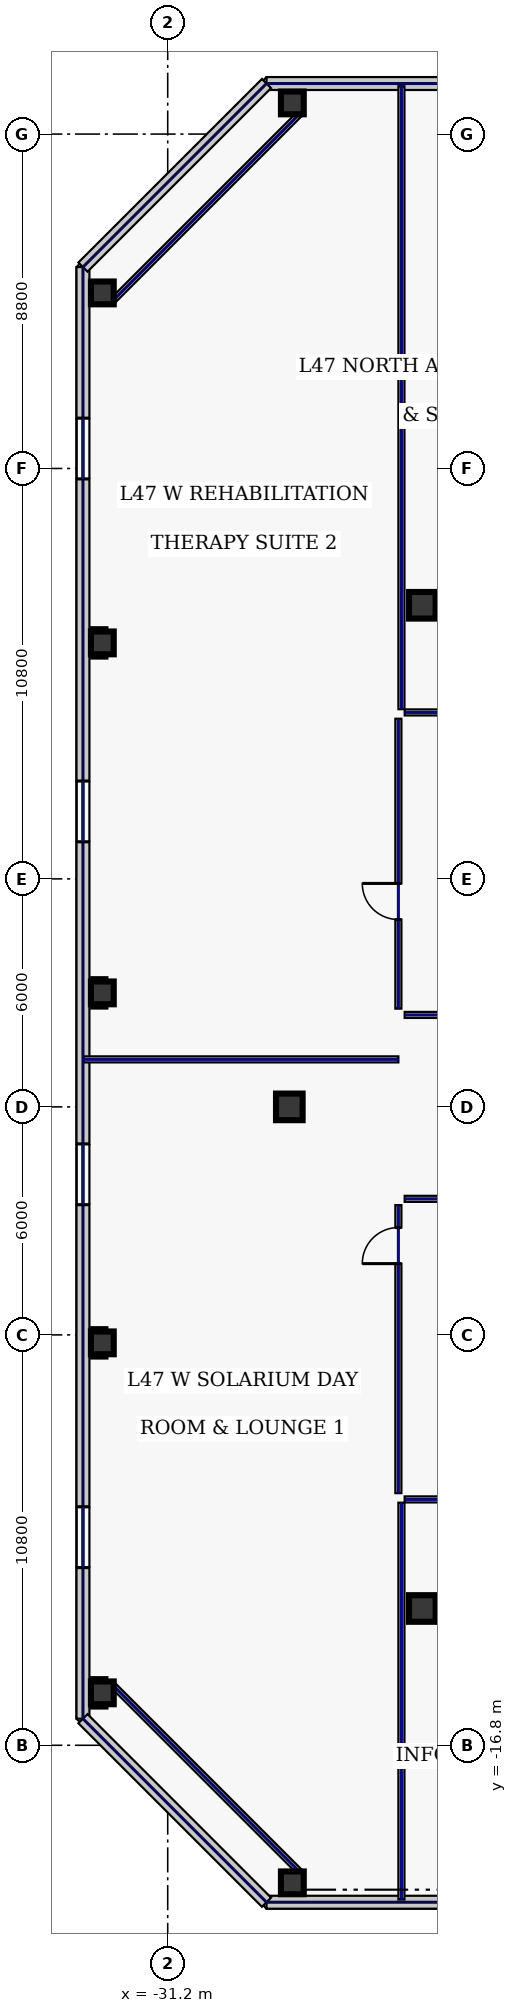
"""IFC4 building model, lengths in metres.
Left out: names, types, materials, properties, quantities, classifications, styles, units other than length and angle.
Written with IfcOpenShell. Run it as: python <this file> out.ifc"""

import sys

from ifc_helpers import new_model, si_unit, direction, frame, frame_2d, origin, origin_2d, place, context, subcontext, project, spatial, rectangle, hollow_rectangle, extrude, element, fill, save


model = new_model("IFC4")
c1 = context("Model", 3, precision=1e-05, world=origin(), true_north=direction((0.0, 1.0)))
c2 = subcontext(c1, "Body", "Model", "MODEL_VIEW")
j1 = project(units=[si_unit("LENGTHUNIT", "METRE"), si_unit("PLANEANGLEUNIT", "RADIAN")], contexts=[c1])
p1 = place(None, origin())
s1 = spatial("IfcSite", under=j1, at=p1, CompositionType="ELEMENT")
p2 = place(p1, origin())
s2 = spatial("IfcBuilding", under=s1, at=p2, CompositionType="ELEMENT")
p3 = place(p2, frame((0.0, 0.0, 204.2)))
s3 = spatial("IfcBuildingStorey", under=s2, at=p3, CompositionType="ELEMENT", Elevation=204.2)
for number, where, z_axis, x_axis in (
    (1, (-24.5, -13.2, 0.0), (0.0, 0.0, 1.0), (1.0, 0.0, 0.0)),
    (2, (-24.5, 13.2, 0.0), (0.0, 0.0, 1.0), (1.0, 0.0, 0.0)),
    (3, (-28.0, 0.0, 0.0), (0.0, 0.0, 1.0), (1.0, 0.0, 0.0)),
):
    element("IfcColumn", number, at=place(p3, frame(where, z_axis=z_axis, x_axis=x_axis)), inside=s3, PredefinedType="COLUMN", context=c2, shape_type="SweptSolid", body=[
        extrude(hollow_rectangle(XDim=0.7, YDim=0.7, WallThickness=0.032, at=origin_2d()), origin(), (0.0, 0.0, 1.0), 3.68),
    ])
for number, where, z_axis, x_axis in (
    (4, (-27.92, -20.42, 0.0), (0.0, 0.0, 1.0), (1.0, 0.0, 0.0)),
    (5, (-27.92, 26.42, 0.0), (0.0, 0.0, 1.0), (1.0, 0.0, 0.0)),
    (6, (-32.92, 21.42, 0.0), (0.0, 0.0, 1.0), (1.0, 0.0, 0.0)),
    (7, (-32.92, 12.21, 0.0), (0.0, 0.0, 1.0), (1.0, 0.0, 0.0)),
    (8, (-32.92, 3.0, 0.0), (0.0, 0.0, 1.0), (1.0, 0.0, 0.0)),
    (9, (-32.92, -6.21, 0.0), (0.0, 0.0, 1.0), (1.0, 0.0, 0.0)),
    (10, (-32.92, -15.42, 0.0), (0.0, 0.0, 1.0), (1.0, 0.0, 0.0)),
):
    element("IfcColumn", number, at=place(p3, frame(where, z_axis=z_axis, x_axis=x_axis)), inside=s3, PredefinedType="COLUMN", context=c2, shape_type="SweptSolid", body=[
        extrude(hollow_rectangle(XDim=0.6, YDim=0.6, WallThickness=0.028, at=origin_2d()), origin(), (0.0, 0.0, 1.0), 3.68),
    ])
p4 = place(p3, frame((-28.6, -20.93, 0.0), z_axis=(0.0, 0.0, 1.0), x_axis=(1.0, 0.0, 0.0)))
e11 = element("IfcWall", 11, at=p4, inside=s3, PredefinedType="STANDARD", context=c2, shape_type="SweptSolid", body=[
    extrude(rectangle(XDim=19.937, YDim=0.34, at=frame_2d((9.969, 0.0))), origin(), (0.0, 0.0, 1.0), 2.075),
])
p5 = place(p4, frame((6.204, 0.0, 0.22)))
e12 = element("IfcOpeningElement", 12, at=p5, cuts=e11, PredefinedType="OPENING", context=c2, shape_type="SweptSolid", body=[
    extrude(rectangle(XDim=1.6, YDim=1.2, at=frame_2d((0.8, 0.6))), frame((0.0, 0.18, 0.0), z_axis=(0.0, -1.0, 0.0), x_axis=(1.0, 0.0, 0.0)), (0.0, 0.0, 1.0), 0.36),
])
p6 = place(p4, frame((10.882, 0.0, 0.22)))
e13 = element("IfcOpeningElement", 13, at=p6, cuts=e11, PredefinedType="OPENING", context=c2, shape_type="SweptSolid", body=[
    extrude(rectangle(XDim=1.6, YDim=1.2, at=frame_2d((0.8, 0.6))), frame((0.0, 0.18, 0.0), z_axis=(0.0, -1.0, 0.0), x_axis=(1.0, 0.0, 0.0)), (0.0, 0.0, 1.0), 0.36),
])
p7 = place(p4, frame((14.867, 0.0, 0.22)))
e14 = element("IfcOpeningElement", 14, at=p7, cuts=e11, PredefinedType="OPENING", context=c2, shape_type="SweptSolid", body=[
    extrude(rectangle(XDim=1.6, YDim=1.2, at=frame_2d((0.8, 0.6))), frame((0.0, 0.18, 0.0), z_axis=(0.0, -1.0, 0.0), x_axis=(1.0, 0.0, 0.0)), (0.0, 0.0, 1.0), 0.36),
])
p8 = place(p3, frame((-8.663, 26.93, 0.0), z_axis=(0.0, 0.0, 1.0), x_axis=(-1.0, 0.0, 0.0)))
e15 = element("IfcWall", 15, at=p8, inside=s3, PredefinedType="STANDARD", context=c2, shape_type="SweptSolid", body=[
    extrude(rectangle(XDim=19.937, YDim=0.34, at=frame_2d((9.969, 0.0))), origin(), (0.0, 0.0, 1.0), 3.68),
])
p9 = place(p8, frame((7.455, 0.0, 0.22)))
e16 = element("IfcOpeningElement", 16, at=p9, cuts=e15, PredefinedType="OPENING", context=c2, shape_type="SweptSolid", body=[
    extrude(rectangle(XDim=1.6, YDim=1.2, at=frame_2d((0.8, 0.6))), frame((0.0, 0.18, 0.0), z_axis=(0.0, -1.0, 0.0), x_axis=(1.0, 0.0, 0.0)), (0.0, 0.0, 1.0), 0.36),
])
p10 = place(p3, frame((-33.43, 22.1, 0.0), z_axis=(0.0, 0.0, 1.0), x_axis=(0.0, -1.0, 0.0)))
e17 = element("IfcWall", 17, at=p10, inside=s3, PredefinedType="STANDARD", context=c2, shape_type="SweptSolid", body=[
    extrude(rectangle(XDim=38.2, YDim=0.34, at=frame_2d((19.1, 0.0))), origin(), (0.0, 0.0, 1.0), 2.075),
])
p11 = place(p10, frame((3.975, 0.0, 0.22)))
e18 = element("IfcOpeningElement", 18, at=p11, cuts=e17, PredefinedType="OPENING", context=c2, shape_type="SweptSolid", body=[
    extrude(rectangle(XDim=1.6, YDim=1.2, at=frame_2d((0.8, 0.6))), frame((0.0, 0.18, 0.0), z_axis=(0.0, -1.0, 0.0), x_axis=(1.0, 0.0, 0.0)), (0.0, 0.0, 1.0), 0.36),
])
p12 = place(p10, frame((13.525, 0.0, 0.22)))
e19 = element("IfcOpeningElement", 19, at=p12, cuts=e17, PredefinedType="OPENING", context=c2, shape_type="SweptSolid", body=[
    extrude(rectangle(XDim=1.6, YDim=1.2, at=frame_2d((0.8, 0.6))), frame((0.0, 0.18, 0.0), z_axis=(0.0, -1.0, 0.0), x_axis=(1.0, 0.0, 0.0)), (0.0, 0.0, 1.0), 0.36),
])
p13 = place(p10, frame((23.075, 0.0, 0.22)))
e20 = element("IfcOpeningElement", 20, at=p13, cuts=e17, PredefinedType="OPENING", context=c2, shape_type="SweptSolid", body=[
    extrude(rectangle(XDim=1.6, YDim=1.2, at=frame_2d((0.8, 0.6))), frame((0.0, 0.18, 0.0), z_axis=(0.0, -1.0, 0.0), x_axis=(1.0, 0.0, 0.0)), (0.0, 0.0, 1.0), 0.36),
])
p14 = place(p10, frame((32.625, 0.0, 0.22)))
e21 = element("IfcOpeningElement", 21, at=p14, cuts=e17, PredefinedType="OPENING", context=c2, shape_type="SweptSolid", body=[
    extrude(rectangle(XDim=1.6, YDim=1.2, at=frame_2d((0.8, 0.6))), frame((0.0, 0.18, 0.0), z_axis=(0.0, -1.0, 0.0), x_axis=(1.0, 0.0, 0.0)), (0.0, 0.0, 1.0), 0.36),
])
p15 = place(p3, frame((-28.6, 26.93, 0.0), z_axis=(0.0, 0.0, 1.0), x_axis=(-0.707106781187, -0.707106781187, 0.0)))
e22 = element("IfcWall", 22, at=p15, inside=s3, PredefinedType="STANDARD", context=c2, shape_type="SweptSolid", body=[
    extrude(rectangle(XDim=6.83, YDim=0.34, at=frame_2d((3.415, 0.0))), origin(), (0.0, 0.0, 1.0), 2.075),
])
p16 = place(p3, frame((-33.43, -16.1, 0.0), z_axis=(0.0, 0.0, 1.0), x_axis=(0.707106781187, -0.707106781187, 0.0)))
e23 = element("IfcWall", 23, at=p16, inside=s3, PredefinedType="STANDARD", context=c2, shape_type="SweptSolid", body=[
    extrude(rectangle(XDim=6.83, YDim=0.34, at=frame_2d((3.415, 0.0))), origin(), (0.0, 0.0, 1.0), 3.68),
])
for number, where, z_axis, x_axis in (
    (24, (-27.68, 26.18, 0.0), (0.0, 0.0, 1.0), (-0.707, -0.707, 0.0)),
    (25, (-32.68, -15.18, 0.0), (0.0, 0.0, 1.0), (0.707, -0.707, 0.0)),
):
    element("IfcWall", number, at=place(p3, frame(where, z_axis=z_axis, x_axis=x_axis)), inside=s3, PredefinedType="PARTITIONING", context=c2, shape_type="SweptSolid", body=[
        extrude(rectangle(XDim=7.071, YDim=0.16, at=frame_2d((3.536, 0.0))), origin(), (0.0, 0.0, 1.0), 1.475),
    ])
p17 = place(p3, frame((-25.13, -10.165, 0.0), z_axis=(0.0, 0.0, 1.0), x_axis=(0.0, 1.0, 0.0)))
e26 = element("IfcWall", 26, at=p17, inside=s3, PredefinedType="PARTITIONING", context=c2, shape_type="SweptSolid", body=[
    extrude(rectangle(XDim=7.58, YDim=0.16, at=frame_2d((3.79, 0.0))), origin(), (0.0, 0.0, 1.0), 3.68),
])
p18 = place(p17, frame((6.04, 0.0, 0.0)))
e27 = element("IfcOpeningElement", 27, at=p18, cuts=e26, PredefinedType="OPENING", context=c2, shape_type="SweptSolid", body=[
    extrude(rectangle(XDim=0.95, YDim=2.2, at=frame_2d((0.475, 1.1))), frame((0.0, 0.09, 0.0), z_axis=(0.0, -1.0, 0.0), x_axis=(1.0, 0.0, 0.0)), (0.0, 0.0, 1.0), 0.18),
])
for number, where, z_axis, x_axis in (
    (28, (-24.965, -2.42, 0.0), (0.0, 0.0, 1.0), (1.0, 0.0, 0.0)),
    (29, (-22.985, 2.42, 0.0), (0.0, 0.0, 1.0), (-1.0, 0.0, 0.0)),
):
    element("IfcWall", number, at=place(p3, frame(where, z_axis=z_axis, x_axis=x_axis)), inside=s3, PredefinedType="PARTITIONING", context=c2, shape_type="SweptSolid", body=[
        extrude(rectangle(XDim=1.98, YDim=0.16, at=frame_2d((0.99, 0.0))), origin(), (0.0, 0.0, 1.0), 3.68),
    ])
p19 = place(p3, frame((-25.13, 2.585, 0.0), z_axis=(0.0, 0.0, 1.0), x_axis=(0.0, 1.0, 0.0)))
e30 = element("IfcWall", 30, at=p19, inside=s3, PredefinedType="PARTITIONING", context=c2, shape_type="SweptSolid", body=[
    extrude(rectangle(XDim=7.63, YDim=0.16, at=frame_2d((3.815, 0.0))), origin(), (0.0, 0.0, 1.0), 3.68),
])
p20 = place(p19, frame((2.345, 0.0, 0.0)))
e31 = element("IfcOpeningElement", 31, at=p20, cuts=e30, PredefinedType="OPENING", context=c2, shape_type="SweptSolid", body=[
    extrude(rectangle(XDim=0.95, YDim=2.2, at=frame_2d((0.475, 1.1))), frame((0.0, 0.09, 0.0), z_axis=(0.0, -1.0, 0.0), x_axis=(1.0, 0.0, 0.0)), (0.0, 0.0, 1.0), 0.18),
])
p21 = place(p3, frame((-24.965, 10.38, 0.0), z_axis=(0.0, 0.0, 1.0), x_axis=(1.0, 0.0, 0.0)))
e32 = element("IfcWall", 32, at=p21, inside=s3, PredefinedType="PARTITIONING", context=c2, shape_type="SweptSolid", body=[
    extrude(rectangle(XDim=49.93, YDim=0.16, at=frame_2d((24.965, 0.0))), origin(), (0.0, 0.0, 1.0), 3.68),
])
p22 = place(p21, frame((2.044, 0.0, 0.0)))
e33 = element("IfcOpeningElement", 33, at=p22, cuts=e32, PredefinedType="OPENING", context=c2, shape_type="SweptSolid", body=[
    extrude(rectangle(XDim=0.95, YDim=2.2, at=frame_2d((0.475, 1.1))), frame((0.0, 0.09, 0.0), z_axis=(0.0, -1.0, 0.0), x_axis=(1.0, 0.0, 0.0)), (0.0, 0.0, 1.0), 0.18),
])
p23 = place(p21, frame((7.3, 0.0, 0.0)))
e34 = element("IfcOpeningElement", 34, at=p23, cuts=e32, PredefinedType="OPENING", context=c2, shape_type="SweptSolid", body=[
    extrude(rectangle(XDim=1.15, YDim=2.2, at=frame_2d((0.575, 1.1))), frame((0.0, 0.09, 0.0), z_axis=(0.0, -1.0, 0.0), x_axis=(1.0, 0.0, 0.0)), (0.0, 0.0, 1.0), 0.18),
])
p24 = place(p21, frame((13.1, 0.0, 0.0)))
e35 = element("IfcOpeningElement", 35, at=p24, cuts=e32, PredefinedType="OPENING", context=c2, shape_type="SweptSolid", body=[
    extrude(rectangle(XDim=0.95, YDim=2.2, at=frame_2d((0.475, 1.1))), frame((0.0, 0.09, 0.0), z_axis=(0.0, -1.0, 0.0), x_axis=(1.0, 0.0, 0.0)), (0.0, 0.0, 1.0), 0.18),
])
p25 = place(p21, frame((19.275, 0.0, 0.0)))
e36 = element("IfcOpeningElement", 36, at=p25, cuts=e32, PredefinedType="OPENING", context=c2, shape_type="SweptSolid", body=[
    extrude(rectangle(XDim=1.05, YDim=2.2, at=frame_2d((0.525, 1.1))), frame((0.0, 0.09, 0.0), z_axis=(0.0, -1.0, 0.0), x_axis=(1.0, 0.0, 0.0)), (0.0, 0.0, 1.0), 0.18),
])
p26 = place(p21, frame((28.055, 0.0, 0.0)))
e37 = element("IfcOpeningElement", 37, at=p26, cuts=e32, PredefinedType="OPENING", context=c2, shape_type="SweptSolid", body=[
    extrude(rectangle(XDim=0.95, YDim=2.2, at=frame_2d((0.475, 1.1))), frame((0.0, 0.09, 0.0), z_axis=(0.0, -1.0, 0.0), x_axis=(1.0, 0.0, 0.0)), (0.0, 0.0, 1.0), 0.18),
])
p27 = place(p21, frame((37.055, 0.0, 0.0)))
e38 = element("IfcOpeningElement", 38, at=p27, cuts=e32, PredefinedType="OPENING", context=c2, shape_type="SweptSolid", body=[
    extrude(rectangle(XDim=0.95, YDim=2.2, at=frame_2d((0.475, 1.1))), frame((0.0, 0.09, 0.0), z_axis=(0.0, -1.0, 0.0), x_axis=(1.0, 0.0, 0.0)), (0.0, 0.0, 1.0), 0.18),
])
p28 = place(p21, frame((42.875, 0.0, 0.0)))
e39 = element("IfcOpeningElement", 39, at=p28, cuts=e32, PredefinedType="OPENING", context=c2, shape_type="SweptSolid", body=[
    extrude(rectangle(XDim=0.95, YDim=2.2, at=frame_2d((0.475, 1.1))), frame((0.0, 0.09, 0.0), z_axis=(0.0, -1.0, 0.0), x_axis=(1.0, 0.0, 0.0)), (0.0, 0.0, 1.0), 0.18),
])
p29 = place(p21, frame((45.906, 0.0, 0.0)))
e40 = element("IfcOpeningElement", 40, at=p29, cuts=e32, PredefinedType="OPENING", context=c2, shape_type="SweptSolid", body=[
    extrude(rectangle(XDim=0.95, YDim=2.2, at=frame_2d((0.475, 1.1))), frame((0.0, 0.09, 0.0), z_axis=(0.0, -1.0, 0.0), x_axis=(1.0, 0.0, 0.0)), (0.0, 0.0, 1.0), 0.18),
])
p30 = place(p3, frame((24.965, -10.33, 0.0), z_axis=(0.0, 0.0, 1.0), x_axis=(-1.0, 0.0, 0.0)))
e41 = element("IfcWall", 41, at=p30, inside=s3, PredefinedType="PARTITIONING", context=c2, shape_type="SweptSolid", body=[
    extrude(rectangle(XDim=49.93, YDim=0.16, at=frame_2d((24.965, 0.0))), origin(), (0.0, 0.0, 1.0), 3.68),
])
p31 = place(p30, frame((44.486, 0.0, 0.0)))
e42 = element("IfcOpeningElement", 42, at=p31, cuts=e41, PredefinedType="OPENING", context=c2, shape_type="SweptSolid", body=[
    extrude(rectangle(XDim=1.05, YDim=2.2, at=frame_2d((0.525, 1.1))), frame((0.0, 0.09, 0.0), z_axis=(0.0, -1.0, 0.0), x_axis=(1.0, 0.0, 0.0)), (0.0, 0.0, 1.0), 0.18),
])
p32 = place(p30, frame((31.92, 0.0, 0.0)))
e43 = element("IfcOpeningElement", 43, at=p32, cuts=e41, PredefinedType="OPENING", context=c2, shape_type="SweptSolid", body=[
    extrude(rectangle(XDim=0.95, YDim=2.2, at=frame_2d((0.475, 1.1))), frame((0.0, 0.09, 0.0), z_axis=(0.0, -1.0, 0.0), x_axis=(1.0, 0.0, 0.0)), (0.0, 0.0, 1.0), 0.18),
])
p33 = place(p30, frame((16.74, 0.0, 0.0)))
e44 = element("IfcOpeningElement", 44, at=p33, cuts=e41, PredefinedType="OPENING", context=c2, shape_type="SweptSolid", body=[
    extrude(rectangle(XDim=0.95, YDim=2.2, at=frame_2d((0.475, 1.1))), frame((0.0, 0.09, 0.0), z_axis=(0.0, -1.0, 0.0), x_axis=(1.0, 0.0, 0.0)), (0.0, 0.0, 1.0), 0.18),
])
p34 = place(p30, frame((4.644, 0.0, 0.0)))
e45 = element("IfcOpeningElement", 45, at=p34, cuts=e41, PredefinedType="OPENING", context=c2, shape_type="SweptSolid", body=[
    extrude(rectangle(XDim=0.95, YDim=2.2, at=frame_2d((0.475, 1.1))), frame((0.0, 0.09, 0.0), z_axis=(0.0, -1.0, 0.0), x_axis=(1.0, 0.0, 0.0)), (0.0, 0.0, 1.0), 0.18),
])
p35 = place(p3, frame((-25.05, 10.465, 0.0), z_axis=(0.0, 0.0, 1.0), x_axis=(0.0, 1.0, 0.0)))
e46 = element("IfcWall", 46, at=p35, inside=s3, PredefinedType="PARTITIONING", context=c2, shape_type="SweptSolid", body=[
    extrude(rectangle(XDim=16.395, YDim=0.16, at=frame_2d((8.198, 0.0))), origin(), (0.0, 0.0, 1.0), 1.475),
])
p36 = place(p3, frame((-25.05, -20.86, 0.0), z_axis=(0.0, 0.0, 1.0), x_axis=(0.0, 1.0, 0.0)))
e47 = element("IfcWall", 47, at=p36, inside=s3, PredefinedType="PARTITIONING", context=c2, shape_type="SweptSolid", body=[
    extrude(rectangle(XDim=10.445, YDim=0.16, at=frame_2d((5.223, 0.0))), origin(), (0.0, 0.0, 1.0), 3.68),
])
p37 = place(p3, frame((-33.41, 1.25, 0.0), z_axis=(0.0, 0.0, 1.0), x_axis=(1.0, 0.0, 0.0)))
e48 = element("IfcWall", 48, at=p37, inside=s3, PredefinedType="PARTITIONING", context=c2, shape_type="SweptSolid", body=[
    extrude(rectangle(XDim=8.28, YDim=0.16, at=frame_2d((4.14, 0.0))), origin(), (0.0, 0.0, 1.0), 3.68),
])
p38 = place(p11, origin())
e49 = element("IfcWindow", 49, at=p38, inside=s3, PartitioningType="SINGLE_PANEL", PredefinedType="WINDOW", context=c2, shape_type="SweptSolid", body=[
    extrude(rectangle(XDim=1.6, YDim=1.2, at=frame_2d((0.8, 0.6))), frame((0.0, 0.03, 0.0), z_axis=(0.0, -1.0, 0.0), x_axis=(1.0, 0.0, 0.0)), (0.0, 0.0, 1.0), 0.06),
])
fill(e18, e49)
p39 = place(p12, origin())
e50 = element("IfcWindow", 50, at=p39, inside=s3, PartitioningType="SINGLE_PANEL", PredefinedType="WINDOW", context=c2, shape_type="SweptSolid", body=[
    extrude(rectangle(XDim=1.6, YDim=1.2, at=frame_2d((0.8, 0.6))), frame((0.0, 0.03, 0.0), z_axis=(0.0, -1.0, 0.0), x_axis=(1.0, 0.0, 0.0)), (0.0, 0.0, 1.0), 0.06),
])
fill(e19, e50)
p40 = place(p13, origin())
e51 = element("IfcWindow", 51, at=p40, inside=s3, PartitioningType="SINGLE_PANEL", PredefinedType="WINDOW", context=c2, shape_type="SweptSolid", body=[
    extrude(rectangle(XDim=1.6, YDim=1.2, at=frame_2d((0.8, 0.6))), frame((0.0, 0.03, 0.0), z_axis=(0.0, -1.0, 0.0), x_axis=(1.0, 0.0, 0.0)), (0.0, 0.0, 1.0), 0.06),
])
fill(e20, e51)
p41 = place(p14, origin())
e52 = element("IfcWindow", 52, at=p41, inside=s3, PartitioningType="SINGLE_PANEL", PredefinedType="WINDOW", context=c2, shape_type="SweptSolid", body=[
    extrude(rectangle(XDim=1.6, YDim=1.2, at=frame_2d((0.8, 0.6))), frame((0.0, 0.03, 0.0), z_axis=(0.0, -1.0, 0.0), x_axis=(1.0, 0.0, 0.0)), (0.0, 0.0, 1.0), 0.06),
])
fill(e21, e52)
p42 = place(p18, origin())
e53 = element("IfcDoor", 53, at=p42, inside=s3, OperationType="SINGLE_SWING_LEFT", PredefinedType="DOOR", context=c2, shape_type="SweptSolid", body=[
    extrude(rectangle(XDim=0.95, YDim=2.2, at=frame_2d((0.475, 1.1))), frame((0.0, 0.025, 0.0), z_axis=(0.0, -1.0, 0.0), x_axis=(1.0, 0.0, 0.0)), (0.0, 0.0, 1.0), 0.05),
])
fill(e27, e53)
p43 = place(p20, origin())
e54 = element("IfcDoor", 54, at=p43, inside=s3, OperationType="SINGLE_SWING_RIGHT", PredefinedType="DOOR", context=c2, shape_type="SweptSolid", body=[
    extrude(rectangle(XDim=0.95, YDim=2.2, at=frame_2d((0.475, 1.1))), frame((0.0, 0.025, 0.0), z_axis=(0.0, -1.0, 0.0), x_axis=(1.0, 0.0, 0.0)), (0.0, 0.0, 1.0), 0.05),
])
fill(e31, e54)
save(model, sys.argv[1])
